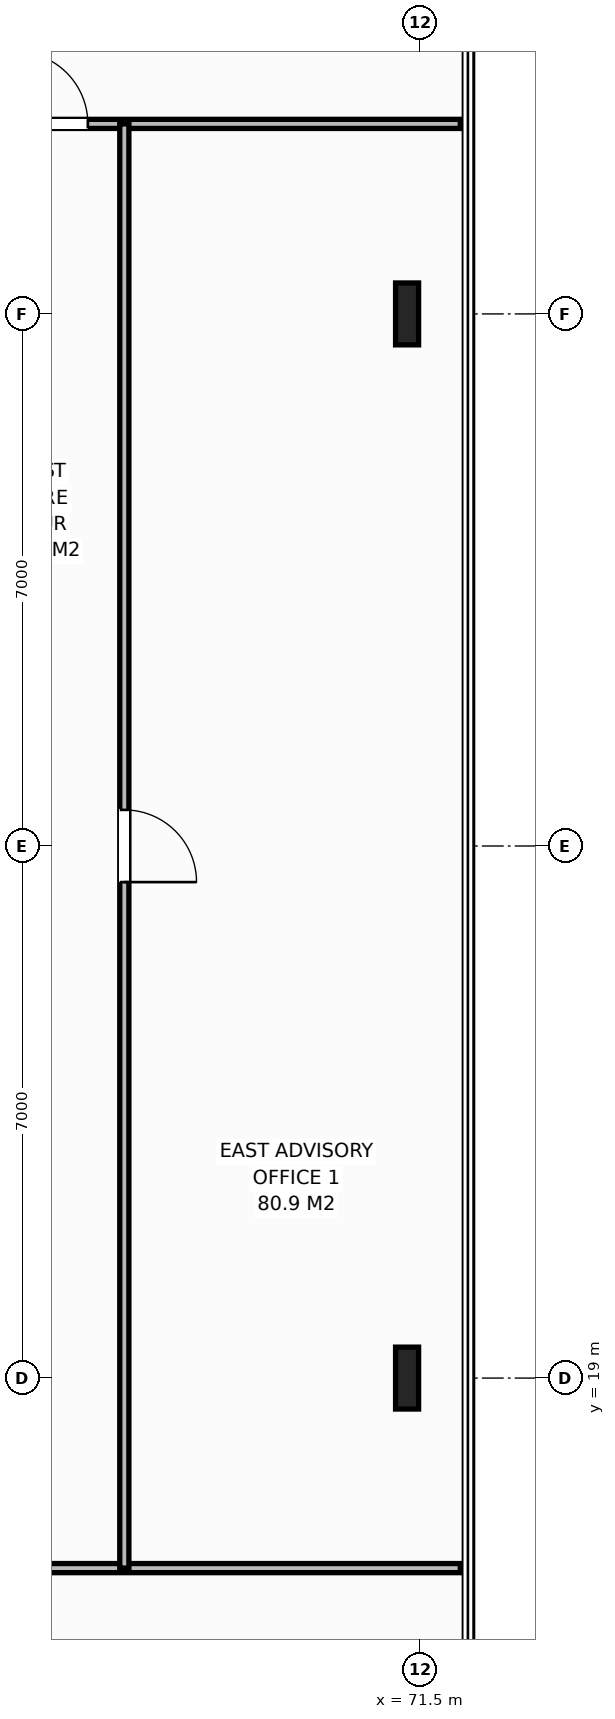
"""IFC4 building model, lengths in metres.
Left out: names, types, materials, properties, quantities, classifications, styles, units other than length and angle.
Written with IfcOpenShell. Run it as: python <this file> out.ifc"""

import sys

from ifc_helpers import new_model, si_unit, direction, frame, frame_2d, origin, origin_2d, place, context, subcontext, project, spatial, rectangle, i_section, extrude, element, fill, save


model = new_model("IFC4")
c1 = context("Model", 3, precision=1e-05, world=origin(), true_north=direction((0.0, 1.0)))
c2 = subcontext(c1, "Body", "Model", "MODEL_VIEW")
j1 = project(units=[si_unit("LENGTHUNIT", "METRE"), si_unit("PLANEANGLEUNIT", "RADIAN")], contexts=[c1])
p1 = place(None, origin())
s1 = spatial("IfcSite", under=j1, at=p1, CompositionType="ELEMENT")
p2 = place(p1, origin())
s2 = spatial("IfcBuilding", under=s1, at=p2, CompositionType="ELEMENT")
p3 = place(p2, frame((0.0, 0.0, 225.2)))
s3 = spatial("IfcBuildingStorey", under=s2, at=p3, CompositionType="ELEMENT", Elevation=225.2)
for number, where, z_axis, x_axis in (
    (1, (71.32, 19.0, 0.0), (0.0, 0.0, 1.0), (1.0, 0.0, 0.0)),
    (2, (71.32, 33.0, 0.0), (0.0, 0.0, 1.0), (1.0, 0.0, 0.0)),
):
    element("IfcColumn", number, at=place(p3, frame(where, z_axis=z_axis, x_axis=x_axis)), inside=s3, PredefinedType="COLUMN", context=c2, shape_type="SweptSolid", body=[
        extrude(i_section(OverallWidth=0.303, OverallDepth=0.814, WebThickness=0.021, FlangeThickness=0.04, at=origin_2d()), origin(), (0.0, 0.0, 1.0), 3.8),
    ])
p4 = place(p3, frame((65.013, 35.5, 0.0), z_axis=(0.0, 0.0, 1.0), x_axis=(1.0, 0.0, 0.0)))
e3 = element("IfcWall", 3, at=p4, inside=s3, PredefinedType="PARTITIONING", context=c2, shape_type="SweptSolid", body=[
    extrude(rectangle(XDim=7.007, YDim=0.12, at=frame_2d((3.504, 0.0))), origin(), (0.0, 0.0, 1.0), 3.58),
])
p5 = place(p4, frame((1.157, 0.0, 0.0)))
e4 = element("IfcOpeningElement", 4, at=p5, cuts=e3, PredefinedType="OPENING", context=c2, shape_type="SweptSolid", body=[
    extrude(rectangle(XDim=0.95, YDim=2.15, at=frame_2d((0.475, 1.075))), frame((0.0, 0.07, 0.0), z_axis=(0.0, -1.0, 0.0), x_axis=(1.0, 0.0, 0.0)), (0.0, 0.0, 1.0), 0.14),
])
p6 = place(p3, frame((58.674, 16.5, 0.0), z_axis=(0.0, 0.0, 1.0), x_axis=(1.0, 0.0, 0.0)))
e5 = element("IfcWall", 5, at=p6, inside=s3, PredefinedType="PARTITIONING", context=c2, shape_type="SweptSolid", body=[
    extrude(rectangle(XDim=13.346, YDim=0.12, at=frame_2d((6.673, 0.0))), origin(), (0.0, 0.0, 1.0), 3.58),
])
p7 = place(p6, frame((3.988, 0.0, 0.0)))
e6 = element("IfcOpeningElement", 6, at=p7, cuts=e5, PredefinedType="OPENING", context=c2, shape_type="SweptSolid", body=[
    extrude(rectangle(XDim=0.95, YDim=2.15, at=frame_2d((0.475, 1.075))), frame((0.0, 0.07, 0.0), z_axis=(0.0, -1.0, 0.0), x_axis=(1.0, 0.0, 0.0)), (0.0, 0.0, 1.0), 0.14),
])
p8 = place(p3, frame((67.6, 16.5, 0.0), z_axis=(0.0, 0.0, 1.0), x_axis=(0.0, 1.0, 0.0)))
e7 = element("IfcWall", 7, at=p8, inside=s3, PredefinedType="PARTITIONING", context=c2, shape_type="SweptSolid", body=[
    extrude(rectangle(XDim=19.0, YDim=0.12, at=frame_2d((9.5, 0.0))), origin(), (0.0, 0.0, 1.0), 3.58),
])
p9 = place(p8, frame((9.025, 0.0, 0.0)))
e8 = element("IfcOpeningElement", 8, at=p9, cuts=e7, PredefinedType="OPENING", context=c2, shape_type="SweptSolid", body=[
    extrude(rectangle(XDim=0.95, YDim=2.15, at=frame_2d((0.475, 1.075))), frame((0.0, 0.07, 0.0), z_axis=(0.0, -1.0, 0.0), x_axis=(1.0, 0.0, 0.0)), (0.0, 0.0, 1.0), 0.14),
])
p10 = place(p5, origin())
e9 = element("IfcDoor", 9, at=p10, inside=s3, OperationType="SINGLE_SWING_LEFT", PredefinedType="DOOR", context=c2, shape_type="SweptSolid", body=[
    extrude(rectangle(XDim=0.95, YDim=2.15, at=frame_2d((0.475, 1.075))), frame((0.0, 0.025, 0.0), z_axis=(0.0, -1.0, 0.0), x_axis=(1.0, 0.0, 0.0)), (0.0, 0.0, 1.0), 0.05),
])
fill(e4, e9)
p11 = place(p9, origin())
e10 = element("IfcDoor", 10, at=p11, inside=s3, OperationType="SINGLE_SWING_RIGHT", PredefinedType="DOOR", context=c2, shape_type="SweptSolid", body=[
    extrude(rectangle(XDim=0.95, YDim=2.15, at=frame_2d((0.475, 1.075))), frame((0.0, 0.025, 0.0), z_axis=(0.0, -1.0, 0.0), x_axis=(1.0, 0.0, 0.0)), (0.0, 0.0, 1.0), 0.05),
])
fill(e8, e10)
save(model, sys.argv[1])
